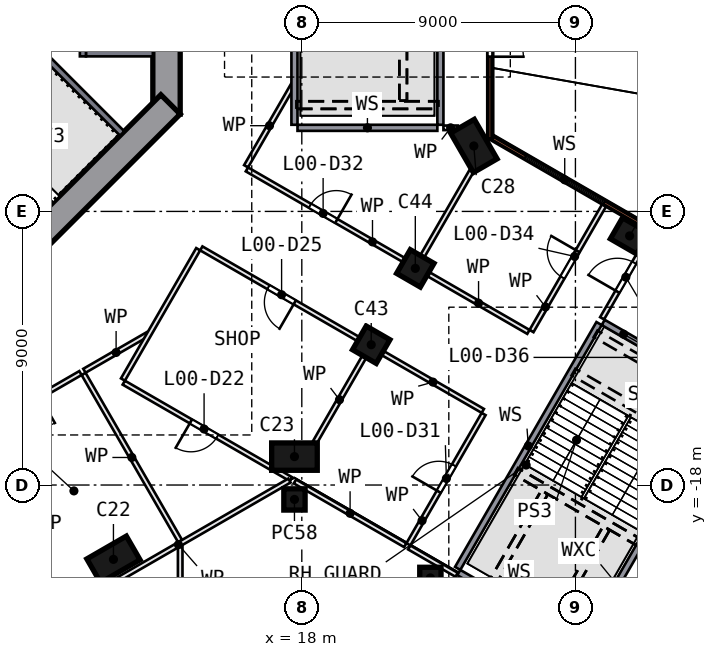
"""IFC4 building model, lengths in metres.
Left out: names, types, materials, properties, quantities, classifications, styles, units other than length and angle.
Written with IfcOpenShell. Run it as: python <this file> out.ifc"""

import sys

from ifc_helpers import new_model, si_unit, direction, frame, frame_2d, origin, origin_2d, place, context, subcontext, project, spatial, polyline, rectangle, outline, extrude, element, fill, save


model = new_model("IFC4")
c1 = context("Model", 3, precision=1e-05, world=origin(), true_north=direction((0.0, 1.0)))
c2 = subcontext(c1, "Body", "Model", "MODEL_VIEW")
j1 = project(units=[si_unit("LENGTHUNIT", "METRE"), si_unit("PLANEANGLEUNIT", "RADIAN")], contexts=[c1])
p1 = place(None, origin())
s1 = spatial("IfcSite", under=j1, at=p1, CompositionType="ELEMENT")
p2 = place(p1, origin())
s2 = spatial("IfcBuilding", under=s1, at=p2, CompositionType="ELEMENT")
p3 = place(p2, origin())
s3 = spatial("IfcBuildingStorey", under=s2, at=p3, CompositionType="ELEMENT", Elevation=0.0)
for number, where, z_axis, x_axis in (
    (1, (11.804, -20.445, 0.0), (0.0, 0.0, 1.0), (0.866, 0.5, 0.0)),
    (2, (17.758, -17.065, 0.0), (0.0, 0.0, 1.0), (-1.0, 0.0, 0.0)),
):
    element("IfcColumn", number, at=place(p3, frame(where, z_axis=z_axis, x_axis=x_axis)), inside=s3, PredefinedType="COLUMN", context=c2, shape_type="SweptSolid", body=[
        extrude(rectangle(XDim=1.5, YDim=0.9, at=origin_2d()), origin(), (0.0, 0.0, 1.0), 7.55),
    ])
p4 = place(p3, frame((28.783, -9.805, 0.0), z_axis=(0.0, 0.0, 1.0), x_axis=(-0.866025404, 0.5, 0.0)))
e3 = element("IfcColumn", 3, at=p4, inside=s3, PredefinedType="COLUMN", context=c2, shape_type="SweptSolid", body=[
    extrude(rectangle(XDim=1.0, YDim=0.8, at=origin_2d()), origin(), (0.0, 0.0, 1.0), 7.55),
])
p5 = place(p3, frame((23.658, -6.846, 0.0), z_axis=(0.0, 0.0, 1.0), x_axis=(0.5, -0.866025404, 0.0)))
e4 = element("IfcColumn", 4, at=p5, inside=s3, PredefinedType="COLUMN", context=c2, shape_type="SweptSolid", body=[
    extrude(rectangle(XDim=1.5, YDim=0.9, at=origin_2d()), origin(), (0.0, 0.0, 1.0), 7.55),
])
for number, where, z_axis, x_axis in (
    (5, (20.283, -13.385, 0.0), (0.0, 0.0, 1.0), (0.866, -0.5, 0.0)),
    (6, (21.733, -10.873, 0.0), (0.0, 0.0, 1.0), (0.866, -0.5, 0.0)),
):
    element("IfcColumn", number, at=place(p3, frame(where, z_axis=z_axis, x_axis=x_axis)), inside=s3, PredefinedType="COLUMN", context=c2, shape_type="SweptSolid", body=[
        extrude(rectangle(XDim=0.9, YDim=0.9, at=origin_2d()), origin(), (0.0, 0.0, 1.0), 7.55),
    ])
p6 = place(p3, frame((13.55, -5.799, 0.0), z_axis=(0.0, 0.0, 1.0), x_axis=(0.0, 1.0, 0.0)))
e7 = element("IfcWall", 7, at=p6, inside=s3, PredefinedType="SHEAR", context=c2, shape_type="SweptSolid", body=[
    extrude(rectangle(XDim=11.598, YDim=0.9, at=frame_2d((5.799, 0.0))), origin(), (0.0, 0.0, 1.0), 8.0),
])
p7 = place(p6, frame((4.899, 0.0, 0.0)))
e8 = element("IfcOpeningElement", 8, at=p7, cuts=e7, PredefinedType="OPENING", context=c2, shape_type="SweptSolid", body=[
    extrude(rectangle(XDim=1.8, YDim=2.1, at=frame_2d((0.9, 1.05))), frame((0.0, 0.46, 0.0), z_axis=(0.0, -1.0, 0.0), x_axis=(1.0, 0.0, 0.0)), (0.0, 0.0, 1.0), 0.92),
])
p8 = place(p3, frame((5.481, -13.682, 0.0), z_axis=(0.0, 0.0, 1.0), x_axis=(0.707106781, 0.707106781, 0.0)))
e9 = element("IfcWall", 9, at=p8, inside=s3, PredefinedType="SHEAR", context=c2, shape_type="SweptSolid", body=[
    extrude(rectangle(XDim=11.598, YDim=0.9, at=frame_2d((5.799, 0.0))), origin(), (0.0, 0.0, 1.0), 8.0),
])
p9 = place(p8, frame((2.099, 0.0, 0.0)))
e10 = element("IfcOpeningElement", 10, at=p9, cuts=e9, PredefinedType="OPENING", context=c2, shape_type="SweptSolid", body=[
    extrude(rectangle(XDim=1.2, YDim=2.1, at=frame_2d((0.6, 1.05))), frame((0.0, 0.46, 0.0), z_axis=(0.0, -1.0, 0.0), x_axis=(1.0, 0.0, 0.0)), (0.0, 0.0, 1.0), 0.92),
])
for number, where, z_axis, x_axis in (
    (11, (17.758, -18.474, 0.0), (0.0, 0.0, 1.0), (0.0, -1.0, 0.0)),
    (12, (22.229, -21.055, 0.0), (0.0, 0.0, 1.0), (0.0, -1.0, 0.0)),
):
    element("IfcColumn", number, at=place(p3, frame(where, z_axis=z_axis, x_axis=x_axis)), inside=s3, PredefinedType="COLUMN", context=c2, shape_type="SweptSolid", body=[
        extrude(rectangle(XDim=0.7, YDim=0.7, at=origin_2d()), origin(), (0.0, 0.0, 1.0), 8.0),
    ])
p10 = place(p3, frame((33.751, -12.062, 0.0), z_axis=(0.0, 0.0, 1.0), x_axis=(-0.86602647, 0.499998154, 0.0)))
e13 = element("IfcWall", 13, at=p10, inside=s3, PredefinedType="SOLIDWALL", context=c2, shape_type="SweptSolid", body=[
    extrude(rectangle(XDim=10.961, YDim=0.14, at=frame_2d((5.481, 0.0))), origin(), (0.0, 0.0, 1.0), 7.55),
])
p11 = place(p10, frame((6.702, 0.0, 0.15)))
e14 = element("IfcOpeningElement", 14, at=p11, cuts=e13, PredefinedType="OPENING", context=c2, shape_type="SweptSolid", body=[
    extrude(rectangle(XDim=3.0, YDim=4.2, at=frame_2d((1.5, 2.1))), frame((0.0, 0.08, 0.0), z_axis=(0.0, -1.0, 0.0), x_axis=(1.0, 0.0, 0.0)), (0.0, 0.0, 1.0), 0.16),
])
p12 = place(p3, frame((24.188, 6.479, 0.0), z_axis=(0.0, 0.0, 1.0), x_axis=(0.0, -1.0, 0.0)))
e15 = element("IfcWall", 15, at=p12, inside=s3, PredefinedType="SOLIDWALL", context=c2, shape_type="SweptSolid", body=[
    extrude(rectangle(XDim=13.1, YDim=0.14, at=frame_2d((6.55, 0.0))), origin(), (0.0, 0.0, 1.0), 7.55),
])
p13 = place(p12, frame((9.29, 0.0, 0.0)))
e16 = element("IfcOpeningElement", 16, at=p13, cuts=e15, PredefinedType="OPENING", context=c2, shape_type="SweptSolid", body=[
    extrude(rectangle(XDim=1.1, YDim=2.4, at=frame_2d((0.55, 1.2))), frame((0.0, 0.08, 0.0), z_axis=(0.0, -1.0, 0.0), x_axis=(1.0, 0.0, 0.0)), (0.0, 0.0, 1.0), 0.16),
])
p14 = place(p3, origin())
e17 = element("IfcWall", 17, at=p14, inside=s3, PredefinedType="SOLIDWALL", context=c2, shape_type="SweptSolid", body=[
    extrude(outline(polyline([(13.1, -3.9), (10.9, -3.9), (10.9, -3.7), (12.9, -3.7), (12.9, -1.4), (10.9, -1.4), (10.9, -1.2), (13.1, -1.2), (13.1, -3.9)])), origin(), (0.0, 0.0, 1.0), 7.55),
])
p15 = place(p3, frame((10.8, -1.2, 0.0), z_axis=(0.0, 0.0, 1.0), x_axis=(0.0, -1.0, 0.0)))
e18 = element("IfcWall", 18, at=p15, inside=s3, PredefinedType="SOLIDWALL", context=c2, shape_type="SweptSolid", body=[
    extrude(rectangle(XDim=2.7, YDim=0.2, at=frame_2d((1.35, 0.0))), origin(), (0.0, 0.0, 1.0), 7.55),
])
p16 = place(p15, frame((0.75, 0.0, 0.0)))
e19 = element("IfcOpeningElement", 19, at=p16, cuts=e18, PredefinedType="OPENING", context=c2, shape_type="SweptSolid", body=[
    extrude(rectangle(XDim=1.2, YDim=2.1, at=frame_2d((0.6, 1.05))), frame((0.0, 0.11, 0.0), z_axis=(0.0, -1.0, 0.0), x_axis=(1.0, 0.0, 0.0)), (0.0, 0.0, 1.0), 0.22),
])
p17 = place(p3, frame((9.334, -3.677, 0.0), z_axis=(0.0, 0.0, 1.0), x_axis=(0.707106781, -0.707106781, 0.0)))
e20 = element("IfcWall", 20, at=p17, inside=s3, PredefinedType="SOLIDWALL", context=c2, shape_type="SweptSolid", body=[
    extrude(rectangle(XDim=3.9, YDim=0.2, at=frame_2d((1.95, 0.0))), origin(), (0.0, 0.0, 1.0), 7.55),
])
p18 = place(p3, frame((10.186, -22.043, 0.0), z_axis=(0.0, 0.0, 1.0), x_axis=(-0.499976504, 0.866038969, 0.0)))
e21 = element("IfcWall", 21, at=p18, inside=s3, PredefinedType="PARTITIONING", context=c2, shape_type="SweptSolid", body=[
    extrude(rectangle(XDim=6.35, YDim=0.15, at=frame_2d((3.175, 0.0))), origin(), (0.0, 0.0, 1.0), 7.55),
])
p19 = place(p3, frame((10.719, -14.317, 0.0), z_axis=(0.0, 0.0, 1.0), x_axis=(-0.866003829, -0.500037366, 0.0)))
e22 = element("IfcWall", 22, at=p19, inside=s3, PredefinedType="PARTITIONING", context=c2, shape_type="SweptSolid", body=[
    extrude(rectangle(XDim=4.25, YDim=0.15, at=frame_2d((2.125, 0.0))), origin(), (0.0, 0.0, 1.0), 7.55),
])
p20 = place(p19, frame((1.55, 0.0, 0.0)))
e23 = element("IfcOpeningElement", 23, at=p20, cuts=e22, PredefinedType="OPENING", context=c2, shape_type="SweptSolid", body=[
    extrude(rectangle(XDim=1.0, YDim=2.1, at=frame_2d((0.5, 1.05))), frame((0.0, 0.085, 0.0), z_axis=(0.0, -1.0, 0.0), x_axis=(1.0, 0.0, 0.0)), (0.0, 0.0, 1.0), 0.17),
])
p21 = place(p3, frame((17.643, -17.807, 0.0), z_axis=(0.0, 0.0, 1.0), x_axis=(-0.866029357, 0.499993152, 0.0)))
e24 = element("IfcWall", 24, at=p21, inside=s3, PredefinedType="PARTITIONING", context=c2, shape_type="SweptSolid", body=[
    extrude(rectangle(XDim=6.35, YDim=0.15, at=frame_2d((3.175, 0.0))), origin(), (0.0, 0.0, 1.0), 7.55),
])
p22 = place(p21, frame((2.8, 0.0, 0.0)))
e25 = element("IfcOpeningElement", 25, at=p22, cuts=e24, PredefinedType="OPENING", context=c2, shape_type="SweptSolid", body=[
    extrude(rectangle(XDim=1.0, YDim=2.1, at=frame_2d((0.5, 1.05))), frame((0.0, 0.085, 0.0), z_axis=(0.0, -1.0, 0.0), x_axis=(1.0, 0.0, 0.0)), (0.0, 0.0, 1.0), 0.17),
])
p23 = place(p3, frame((12.935, -13.038, 0.0), z_axis=(0.0, 0.0, 1.0), x_axis=(-0.866064057, -0.499933044, 0.0)))
e26 = element("IfcWall", 26, at=p23, inside=s3, PredefinedType="PARTITIONING", context=c2, shape_type="SweptSolid", body=[
    extrude(rectangle(XDim=2.408, YDim=0.15, at=frame_2d((1.204, 0.0))), origin(), (0.0, 0.0, 1.0), 7.55),
])
p24 = place(p3, frame((14.0, -36.925, 0.0), z_axis=(0.0, 0.0, 1.0), x_axis=(0.0, 1.0, 0.0)))
e27 = element("IfcWall", 27, at=p24, inside=s3, PredefinedType="PARTITIONING", context=c2, shape_type="SweptSolid", body=[
    extrude(rectangle(XDim=16.922, YDim=0.15, at=frame_2d((8.461, 0.0))), origin(), (0.0, 0.0, 1.0), 7.55),
])
p25 = place(p24, frame((7.572, 0.0, 0.0)))
e28 = element("IfcOpeningElement", 28, at=p25, cuts=e27, PredefinedType="OPENING", context=c2, shape_type="SweptSolid", body=[
    extrude(rectangle(XDim=1.8, YDim=2.1, at=frame_2d((0.9, 1.05))), frame((0.0, 0.085, 0.0), z_axis=(0.0, -1.0, 0.0), x_axis=(1.0, 0.0, 0.0)), (0.0, 0.0, 1.0), 0.17),
])
p26 = place(p3, frame((13.997, -19.843, 0.0), z_axis=(0.0, 0.0, 1.0), x_axis=(-0.499976504, 0.866038969, 0.0)))
e29 = element("IfcWall", 29, at=p26, inside=s3, PredefinedType="PARTITIONING", context=c2, shape_type="SweptSolid", body=[
    extrude(rectangle(XDim=6.35, YDim=0.15, at=frame_2d((3.175, 0.0))), origin(), (0.0, 0.0, 1.0), 7.55),
])
p27 = place(p3, frame((14.592, -10.243, 0.0), z_axis=(0.0, 0.0, 1.0), x_axis=(-0.500011342, -0.866018855, 0.0)))
e30 = element("IfcWall", 30, at=p27, inside=s3, PredefinedType="PARTITIONING", context=c2, shape_type="SweptSolid", body=[
    extrude(rectangle(XDim=4.95, YDim=0.15, at=frame_2d((2.475, 0.0))), origin(), (0.0, 0.0, 1.0), 7.55),
])
p28 = place(p3, frame((19.843, -13.188, 0.0), z_axis=(0.0, 0.0, 1.0), x_axis=(-0.866028293, 0.499994996, 0.0)))
e31 = element("IfcWall", 31, at=p28, inside=s3, PredefinedType="PARTITIONING", context=c2, shape_type="SweptSolid", body=[
    extrude(rectangle(XDim=5.945, YDim=0.15, at=frame_2d((2.972, 0.0))), origin(), (0.0, 0.0, 1.0), 7.55),
])
p29 = place(p28, frame((2.395, 0.0, 0.0)))
e32 = element("IfcOpeningElement", 32, at=p29, cuts=e31, PredefinedType="OPENING", context=c2, shape_type="SweptSolid", body=[
    extrude(rectangle(XDim=1.0, YDim=2.1, at=frame_2d((0.5, 1.05))), frame((0.0, 0.085, 0.0), z_axis=(0.0, -1.0, 0.0), x_axis=(1.0, 0.0, 0.0)), (0.0, 0.0, 1.0), 0.17),
])
p30 = place(p3, frame((20.674, -13.668, 0.0), z_axis=(0.0, 0.0, 1.0), x_axis=(0.866024533, -0.500001508, 0.0)))
e33 = element("IfcWall", 33, at=p30, inside=s3, PredefinedType="PARTITIONING", context=c2, shape_type="SweptSolid", body=[
    extrude(rectangle(XDim=3.787, YDim=0.15, at=frame_2d((1.893, 0.0))), origin(), (0.0, 0.0, 1.0), 7.55),
])
p31 = place(p3, frame((17.593, -17.854, 0.0), z_axis=(0.0, 0.0, 1.0), x_axis=(-0.866022179, -0.500005586, 0.0)))
e34 = element("IfcWall", 34, at=p31, inside=s3, PredefinedType="PARTITIONING", context=c2, shape_type="SweptSolid", body=[
    extrude(rectangle(XDim=8.435, YDim=0.15, at=frame_2d((4.217, 0.0))), origin(), (0.0, 0.0, 1.0), 7.55),
])
p32 = place(p3, frame((18.436, -16.585, 0.0), z_axis=(0.0, 0.0, 1.0), x_axis=(0.49995248, 0.866052838, 0.0)))
e35 = element("IfcWall", 35, at=p32, inside=s3, PredefinedType="PARTITIONING", context=c2, shape_type="SweptSolid", body=[
    extrude(rectangle(XDim=3.216, YDim=0.15, at=frame_2d((1.608, 0.0))), origin(), (0.0, 0.0, 1.0), 7.55),
])
p33 = place(p3, frame((17.773, -17.882, 0.0), z_axis=(0.0, 0.0, 1.0), x_axis=(0.866005191, -0.500035008, 0.0)))
e36 = element("IfcWall", 36, at=p33, inside=s3, PredefinedType="PARTITIONING", context=c2, shape_type="SweptSolid", body=[
    extrude(rectangle(XDim=4.192, YDim=0.15, at=frame_2d((2.096, 0.0))), origin(), (0.0, 0.0, 1.0), 7.55),
])
p34 = place(p3, frame((17.858, -6.25, 0.0), z_axis=(0.0, 0.0, 1.0), x_axis=(1.0, 0.0, 0.0)))
e37 = element("IfcWall", 37, at=p34, inside=s3, PredefinedType="SOLIDWALL", context=c2, shape_type="SweptSolid", body=[
    extrude(rectangle(XDim=4.6, YDim=0.2, at=frame_2d((2.3, 0.0))), origin(), (0.0, 0.0, 1.0), 7.55),
])
p35 = place(p3, frame((17.708, -4.845, 0.0), z_axis=(0.0, 0.0, 1.0), x_axis=(-0.499996601, -0.866027366, 0.0)))
e38 = element("IfcWall", 38, at=p35, inside=s3, PredefinedType="PARTITIONING", context=c2, shape_type="SweptSolid", body=[
    extrude(rectangle(XDim=3.083, YDim=0.15, at=frame_2d((1.542, 0.0))), origin(), (0.0, 0.0, 1.0), 7.55),
])
p36 = place(p3, frame((17.758, 3.15, 0.0), z_axis=(0.0, 0.0, 1.0), x_axis=(0.0, -1.0, 0.0)))
e39 = element("IfcWall", 39, at=p36, inside=s3, PredefinedType="SOLIDWALL", context=c2, shape_type="SweptSolid", body=[
    extrude(rectangle(XDim=9.3, YDim=0.2, at=frame_2d((4.65, 0.0))), origin(), (0.0, 0.0, 1.0), 7.55),
])
p37 = place(p3, frame((21.533, -20.053, 0.0), z_axis=(0.0, 0.0, 1.0), x_axis=(0.865989076, -0.500062917, 0.0)))
e40 = element("IfcWall", 40, at=p37, inside=s3, PredefinedType="PARTITIONING", context=c2, shape_type="SweptSolid", body=[
    extrude(rectangle(XDim=1.8, YDim=0.15, at=frame_2d((0.9, 0.0))), origin(), (0.0, 0.0, 1.0), 7.55),
])
p38 = place(p3, frame((21.973, -10.458, 0.0), z_axis=(0.0, 0.0, 1.0), x_axis=(0.500009422, 0.866019964, 0.0)))
e41 = element("IfcWall", 41, at=p38, inside=s3, PredefinedType="PARTITIONING", context=c2, shape_type="SweptSolid", body=[
    extrude(rectangle(XDim=3.216, YDim=0.15, at=frame_2d((1.608, 0.0))), origin(), (0.0, 0.0, 1.0), 7.55),
])
p39 = place(p3, frame((22.558, -6.15, 0.0), z_axis=(0.0, 0.0, 1.0), x_axis=(0.0, 1.0, 0.0)))
e42 = element("IfcWall", 42, at=p39, inside=s3, PredefinedType="SOLIDWALL", context=c2, shape_type="SweptSolid", body=[
    extrude(rectangle(XDim=9.5, YDim=0.2, at=frame_2d((4.75, 0.0))), origin(), (0.0, 0.0, 1.0), 7.55),
])
p40 = place(p3, frame((22.658, -6.25, 0.0), z_axis=(0.0, 0.0, 1.0), x_axis=(1.0, 0.0, 0.0)))
e43 = element("IfcWall", 43, at=p40, inside=s3, PredefinedType="PARTITIONING", context=c2, shape_type="SweptSolid", body=[
    extrude(rectangle(XDim=0.473, YDim=0.15, at=frame_2d((0.237, 0.0))), origin(), (0.0, 0.0, 1.0), 7.55),
])
p41 = place(p3, frame((23.164, -20.879, 0.0), z_axis=(0.0, 0.0, 1.0), x_axis=(0.866030039, -0.499991972, 0.0)))
e44 = element("IfcWall", 44, at=p41, inside=s3, PredefinedType="SOLIDWALL", context=c2, shape_type="SweptSolid", body=[
    extrude(rectangle(XDim=4.6, YDim=0.2, at=frame_2d((2.3, 0.0))), origin(), (0.0, 0.0, 1.0), 7.55),
])
p42 = place(p3, frame((21.506, -19.951, 0.0), z_axis=(0.0, 0.0, 1.0), x_axis=(0.499995708, 0.866027882, 0.0)))
e45 = element("IfcWall", 45, at=p42, inside=s3, PredefinedType="PARTITIONING", context=c2, shape_type="SweptSolid", body=[
    extrude(rectangle(XDim=4.95, YDim=0.15, at=frame_2d((2.475, 0.0))), origin(), (0.0, 0.0, 1.0), 7.55),
])
p43 = place(p42, frame((2.0, 0.0, 0.0)))
e46 = element("IfcOpeningElement", 46, at=p43, cuts=e45, PredefinedType="OPENING", context=c2, shape_type="SweptSolid", body=[
    extrude(rectangle(XDim=1.0, YDim=2.1, at=frame_2d((0.5, 1.05))), frame((0.0, 0.085, 0.0), z_axis=(0.0, -1.0, 0.0), x_axis=(1.0, 0.0, 0.0)), (0.0, 0.0, 1.0), 0.17),
])
p44 = place(p3, frame((16.194, -7.618, 0.0), z_axis=(0.0, 0.0, 1.0), x_axis=(0.866028293, -0.499994996, 0.0)))
e47 = element("IfcWall", 47, at=p44, inside=s3, PredefinedType="PARTITIONING", context=c2, shape_type="SweptSolid", body=[
    extrude(rectangle(XDim=5.945, YDim=0.15, at=frame_2d((2.972, 0.0))), origin(), (0.0, 0.0, 1.0), 7.55),
])
p45 = place(p44, frame((2.395, 0.0, 0.0)))
e48 = element("IfcOpeningElement", 48, at=p45, cuts=e47, PredefinedType="OPENING", context=c2, shape_type="SweptSolid", body=[
    extrude(rectangle(XDim=1.0, YDim=2.1, at=frame_2d((0.5, 1.05))), frame((0.0, 0.085, 0.0), z_axis=(0.0, -1.0, 0.0), x_axis=(1.0, 0.0, 0.0)), (0.0, 0.0, 1.0), 0.17),
])
p46 = place(p3, frame((25.453, -12.963, 0.0), z_axis=(0.0, 0.0, 1.0), x_axis=(-0.866024533, 0.500001508, 0.0)))
e49 = element("IfcWall", 49, at=p46, inside=s3, PredefinedType="PARTITIONING", context=c2, shape_type="SweptSolid", body=[
    extrude(rectangle(XDim=3.787, YDim=0.15, at=frame_2d((1.893, 0.0))), origin(), (0.0, 0.0, 1.0), 7.55),
])
p47 = place(p3, frame((28.162, -21.623, 0.0), z_axis=(0.0, 0.0, 1.0), x_axis=(0.499981072, 0.866036332, 0.0)))
e50 = element("IfcWall", 50, at=p47, inside=s3, PredefinedType="SOLIDWALL", context=c2, shape_type="SweptSolid", body=[
    extrude(rectangle(XDim=7.545, YDim=0.2, at=frame_2d((3.772, 0.0))), origin(), (0.0, 0.0, 1.0), 7.55),
])
p48 = place(p3, frame((27.777, -12.688, 0.0), z_axis=(0.0, 0.0, 1.0), x_axis=(-0.500004225, -0.866022964, 0.0)))
e51 = element("IfcWall", 51, at=p48, inside=s3, PredefinedType="SOLIDWALL", context=c2, shape_type="SweptSolid", body=[
    extrude(rectangle(XDim=9.3, YDim=0.2, at=frame_2d((4.65, 0.0))), origin(), (0.0, 0.0, 1.0), 7.55),
])
p49 = place(p3, frame((25.556, -12.936, 0.0), z_axis=(0.0, 0.0, 1.0), x_axis=(0.499963896, 0.866046247, 0.0)))
e52 = element("IfcWall", 52, at=p49, inside=s3, PredefinedType="PARTITIONING", context=c2, shape_type="SweptSolid", body=[
    extrude(rectangle(XDim=4.785, YDim=0.15, at=frame_2d((2.393, 0.0))), origin(), (0.0, 0.0, 1.0), 7.55),
])
p50 = place(p49, frame((2.035, 0.0, 0.0)))
e53 = element("IfcOpeningElement", 53, at=p50, cuts=e52, PredefinedType="OPENING", context=c2, shape_type="SweptSolid", body=[
    extrude(rectangle(XDim=1.0, YDim=2.1, at=frame_2d((0.5, 1.05))), frame((0.0, 0.085, 0.0), z_axis=(0.0, -1.0, 0.0), x_axis=(1.0, 0.0, 0.0)), (0.0, 0.0, 1.0), 0.17),
])
p51 = place(p3, frame((27.877, -12.515, 0.0), z_axis=(0.0, 0.0, 1.0), x_axis=(0.499973122, 0.866040921, 0.0)))
e54 = element("IfcWall", 54, at=p51, inside=s3, PredefinedType="PARTITIONING", context=c2, shape_type="SweptSolid", body=[
    extrude(rectangle(XDim=3.26, YDim=0.15, at=frame_2d((1.63, 0.0))), origin(), (0.0, 0.0, 1.0), 7.55),
])
p52 = place(p51, frame((1.01, 0.0, 0.0)))
e55 = element("IfcOpeningElement", 55, at=p52, cuts=e54, PredefinedType="OPENING", context=c2, shape_type="SweptSolid", body=[
    extrude(rectangle(XDim=1.1, YDim=2.1, at=frame_2d((0.55, 1.05))), frame((0.0, 0.085, 0.0), z_axis=(0.0, -1.0, 0.0), x_axis=(1.0, 0.0, 0.0)), (0.0, 0.0, 1.0), 0.17),
])
p53 = place(p3, frame((27.914, -12.652, 0.0), z_axis=(0.0, 0.0, 1.0), x_axis=(0.86601677, -0.500014953, 0.0)))
e56 = element("IfcWall", 56, at=p53, inside=s3, PredefinedType="SOLIDWALL", context=c2, shape_type="SweptSolid", body=[
    extrude(rectangle(XDim=4.6, YDim=0.2, at=frame_2d((2.3, 0.0))), origin(), (0.0, 0.0, 1.0), 7.55),
])
p54 = place(p53, frame((1.75, 0.0, 0.0)))
e57 = element("IfcOpeningElement", 57, at=p54, cuts=e56, PredefinedType="OPENING", context=c2, shape_type="SweptSolid", body=[
    extrude(rectangle(XDim=1.1, YDim=2.1, at=frame_2d((0.55, 1.05))), frame((0.0, 0.11, 0.0), z_axis=(0.0, -1.0, 0.0), x_axis=(1.0, 0.0, 0.0)), (0.0, 0.0, 1.0), 0.22),
])
p55 = place(p11, origin())
e58 = element("IfcWindow", 58, at=p55, inside=s3, PartitioningType="SINGLE_PANEL", PredefinedType="WINDOW", context=c2, shape_type="SweptSolid", body=[
    extrude(rectangle(XDim=3.0, YDim=4.2, at=frame_2d((1.5, 2.1))), frame((0.0, 0.03, 0.0), z_axis=(0.0, -1.0, 0.0), x_axis=(1.0, 0.0, 0.0)), (0.0, 0.0, 1.0), 0.06),
])
fill(e14, e58)
p56 = place(p13, origin())
e59 = element("IfcDoor", 59, at=p56, inside=s3, OperationType="SINGLE_SWING_RIGHT", PredefinedType="DOOR", context=c2, shape_type="SweptSolid", body=[
    extrude(rectangle(XDim=1.1, YDim=2.4, at=frame_2d((0.55, 1.2))), frame((0.0, 0.025, 0.0), z_axis=(0.0, -1.0, 0.0), x_axis=(1.0, 0.0, 0.0)), (0.0, 0.0, 1.0), 0.05),
])
fill(e16, e59)
p57 = place(p22, origin())
e60 = element("IfcDoor", 60, at=p57, inside=s3, OperationType="SINGLE_SWING_RIGHT", PredefinedType="DOOR", context=c2, shape_type="SweptSolid", body=[
    extrude(rectangle(XDim=1.0, YDim=2.1, at=frame_2d((0.5, 1.05))), frame((0.0, 0.025, 0.0), z_axis=(0.0, -1.0, 0.0), x_axis=(1.0, 0.0, 0.0)), (0.0, 0.0, 1.0), 0.05),
])
fill(e25, e60)
p58 = place(p29, origin())
e61 = element("IfcDoor", 61, at=p58, inside=s3, OperationType="SINGLE_SWING_LEFT", PredefinedType="DOOR", context=c2, shape_type="SweptSolid", body=[
    extrude(rectangle(XDim=1.0, YDim=2.1, at=frame_2d((0.5, 1.05))), frame((0.0, 0.025, 0.0), z_axis=(0.0, -1.0, 0.0), x_axis=(1.0, 0.0, 0.0)), (0.0, 0.0, 1.0), 0.05),
])
fill(e32, e61)
p59 = place(p43, origin())
e62 = element("IfcDoor", 62, at=p59, inside=s3, OperationType="SINGLE_SWING_LEFT", PredefinedType="DOOR", context=c2, shape_type="SweptSolid", body=[
    extrude(rectangle(XDim=1.0, YDim=2.1, at=frame_2d((0.5, 1.05))), frame((0.0, 0.025, 0.0), z_axis=(0.0, -1.0, 0.0), x_axis=(1.0, 0.0, 0.0)), (0.0, 0.0, 1.0), 0.05),
])
fill(e46, e62)
p60 = place(p45, origin())
e63 = element("IfcDoor", 63, at=p60, inside=s3, OperationType="SINGLE_SWING_RIGHT", PredefinedType="DOOR", context=c2, shape_type="SweptSolid", body=[
    extrude(rectangle(XDim=1.0, YDim=2.1, at=frame_2d((0.5, 1.05))), frame((0.0, 0.025, 0.0), z_axis=(0.0, -1.0, 0.0), x_axis=(1.0, 0.0, 0.0)), (0.0, 0.0, 1.0), 0.05),
])
fill(e48, e63)
p61 = place(p50, origin())
e64 = element("IfcDoor", 64, at=p61, inside=s3, OperationType="SINGLE_SWING_RIGHT", PredefinedType="DOOR", context=c2, shape_type="SweptSolid", body=[
    extrude(rectangle(XDim=1.0, YDim=2.1, at=frame_2d((0.5, 1.05))), frame((0.0, 0.025, 0.0), z_axis=(0.0, -1.0, 0.0), x_axis=(1.0, 0.0, 0.0)), (0.0, 0.0, 1.0), 0.05),
])
fill(e53, e64)
p62 = place(p52, origin())
e65 = element("IfcDoor", 65, at=p62, inside=s3, OperationType="SINGLE_SWING_LEFT", PredefinedType="DOOR", context=c2, shape_type="SweptSolid", body=[
    extrude(rectangle(XDim=1.1, YDim=2.1, at=frame_2d((0.55, 1.05))), frame((0.0, 0.025, 0.0), z_axis=(0.0, -1.0, 0.0), x_axis=(1.0, 0.0, 0.0)), (0.0, 0.0, 1.0), 0.05),
])
fill(e55, e65)
save(model, sys.argv[1])
